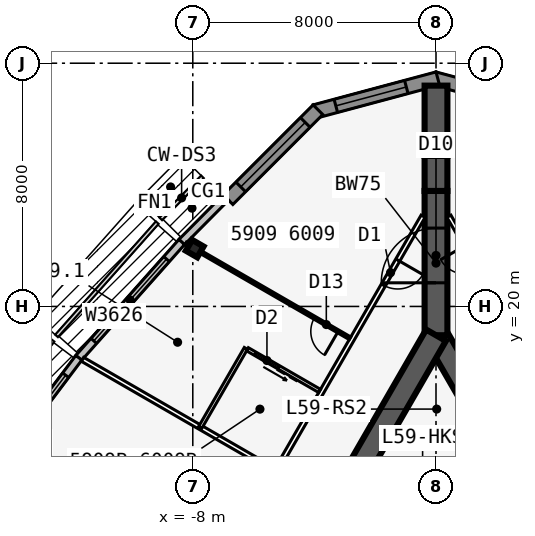
"""IFC4 building model, lengths in metres.
Left out: names, types, materials, properties, quantities, classifications, styles, units other than length and angle.
Written with IfcOpenShell. Run it as: python <this file> out.ifc"""

import sys

from ifc_helpers import new_model, si_unit, direction, frame, frame_2d, origin, origin_2d, place, context, subcontext, project, spatial, polyline, rectangle, i_section, outline, extrude, element, fill, save


model = new_model("IFC4")
c1 = context("Model", 3, precision=1e-05, world=origin(), true_north=direction((0.0, 1.0)))
c2 = subcontext(c1, "Body", "Model", "MODEL_VIEW")
j1 = project(units=[si_unit("LENGTHUNIT", "METRE"), si_unit("PLANEANGLEUNIT", "RADIAN")], contexts=[c1])
p1 = place(None, origin())
s1 = spatial("IfcSite", under=j1, at=p1, CompositionType="ELEMENT")
p2 = place(p1, origin())
s2 = spatial("IfcBuilding", under=s1, at=p2, CompositionType="ELEMENT")
p3 = place(p2, frame((0.0, 0.0, 222.5)))
s3 = spatial("IfcBuildingStorey", under=s2, at=p3, CompositionType="ELEMENT", Elevation=222.5)
p4 = place(p3, frame((16.5, -9.526, 0.0), z_axis=(0.0, 0.0, 1.0), x_axis=(-0.499999749417, 0.866025548458, 0.0)))
e1 = element("IfcWall", 1, at=p4, inside=s3, PredefinedType="SHEAR", context=c2, shape_type="SweptSolid", body=[
    extrude(rectangle(XDim=33.0, YDim=0.75, at=frame_2d((16.5, 0.0))), origin(), (0.0, 0.0, 1.0), 3.6),
])
p5 = place(p4, frame((14.15, 0.0, 0.0)))
e2 = element("IfcOpeningElement", 2, at=p5, cuts=e1, PredefinedType="OPENING", context=c2, shape_type="SweptSolid", body=[
    extrude(rectangle(XDim=1.8, YDim=2.13, at=frame_2d((0.9, 1.065))), frame((0.0, 0.385, 0.0), z_axis=(0.0, -1.0, 0.0), x_axis=(1.0, 0.0, 0.0)), (0.0, 0.0, 1.0), 0.77),
])
p6 = place(p4, frame((12.6, 0.0, 0.0)))
e3 = element("IfcOpeningElement", 3, at=p6, cuts=e1, PredefinedType="OPENING", context=c2, shape_type="SweptSolid", body=[
    extrude(rectangle(XDim=1.0, YDim=2.13, at=frame_2d((0.5, 1.065))), frame((0.0, 0.385, 0.0), z_axis=(0.0, -1.0, 0.0), x_axis=(1.0, 0.0, 0.0)), (0.0, 0.0, 1.0), 0.77),
])
p7 = place(p3, frame((0.0, 19.052, 0.0), z_axis=(0.0, 0.0, 1.0), x_axis=(-0.499999749417, -0.866025548458, 0.0)))
e4 = element("IfcWall", 4, at=p7, inside=s3, PredefinedType="SHEAR", context=c2, shape_type="SweptSolid", body=[
    extrude(rectangle(XDim=33.0, YDim=0.75, at=frame_2d((16.5, 0.0))), origin(), (0.0, 0.0, 1.0), 3.6),
])
p8 = place(p7, frame((14.15, 0.0, 0.0)))
e5 = element("IfcOpeningElement", 5, at=p8, cuts=e4, PredefinedType="OPENING", context=c2, shape_type="SweptSolid", body=[
    extrude(rectangle(XDim=1.8, YDim=2.13, at=frame_2d((0.9, 1.065))), frame((0.0, 0.385, 0.0), z_axis=(0.0, -1.0, 0.0), x_axis=(1.0, 0.0, 0.0)), (0.0, 0.0, 1.0), 0.77),
])
p9 = place(p7, frame((12.6, 0.0, 0.0)))
e6 = element("IfcOpeningElement", 6, at=p9, cuts=e4, PredefinedType="OPENING", context=c2, shape_type="SweptSolid", body=[
    extrude(rectangle(XDim=1.0, YDim=2.13, at=frame_2d((0.5, 1.065))), frame((0.0, 0.385, 0.0), z_axis=(0.0, -1.0, 0.0), x_axis=(1.0, 0.0, 0.0)), (0.0, 0.0, 1.0), 0.77),
])
p10 = place(p3, frame((0.0, 19.052, 0.0), z_axis=(0.0, 0.0, 1.0), x_axis=(0.0, 1.0, 0.0)))
e7 = element("IfcWall", 7, at=p10, inside=s3, PredefinedType="SHEAR", context=c2, shape_type="SweptSolid", body=[
    extrude(rectangle(XDim=4.746, YDim=0.75, at=frame_2d((2.373, 0.0))), origin(), (0.0, 0.0, 1.0), 3.6),
])
p11 = place(p10, frame((1.725, 0.0, 0.0)))
e8 = element("IfcOpeningElement", 8, at=p11, cuts=e7, PredefinedType="OPENING", context=c2, shape_type="SweptSolid", body=[
    extrude(rectangle(XDim=1.8, YDim=2.13, at=frame_2d((0.9, 1.065))), frame((0.0, 0.385, 0.0), z_axis=(0.0, -1.0, 0.0), x_axis=(1.0, 0.0, 0.0)), (0.0, 0.0, 1.0), 0.77),
])
p12 = place(p3, frame((0.0, 23.799, 0.0), z_axis=(0.0, 0.0, 1.0), x_axis=(0.0, 1.0, 0.0)))
e9 = element("IfcWall", 9, at=p12, inside=s3, PredefinedType="SHEAR", context=c2, shape_type="SweptSolid", body=[
    extrude(rectangle(XDim=1.155, YDim=0.75, at=frame_2d((0.577, 0.0))), origin(), (0.0, 0.0, 1.0), 3.6),
])
p13 = place(p3, frame((0.0, 24.953, 0.0), z_axis=(0.0, 0.0, 1.0), x_axis=(0.0, 1.0, 0.0)))
e10 = element("IfcWall", 10, at=p13, inside=s3, PredefinedType="SHEAR", context=c2, shape_type="SweptSolid", body=[
    extrude(rectangle(XDim=2.309, YDim=0.75, at=frame_2d((1.155, 0.0))), origin(), (0.0, 0.0, 1.0), 3.6),
])
p14 = place(p3, frame((-7.937, 21.903, 0.0), z_axis=(0.0, 0.0, 1.0), x_axis=(-0.5, -0.866025403784, 0.0)))
e11 = element("IfcColumn", 11, at=p14, inside=s3, PredefinedType="COLUMN", context=c2, shape_type="SweptSolid", body=[
    extrude(i_section(OverallWidth=0.411, OverallDepth=0.434, WebThickness=0.036, FlangeThickness=0.057, at=origin_2d()), origin(), (0.0, 0.0, 1.0), 3.6),
])
p15 = place(p3, frame((3.983, 26.413, 0.0), z_axis=(0.0, 0.0, 1.0), x_axis=(-0.965920442324, 0.258839137498, 0.0)))
e12 = element("IfcWall", 12, at=p15, inside=s3, PredefinedType="SOLIDWALL", context=c2, shape_type="SweptSolid", body=[
    extrude(outline(polyline([(4.184, 0.225), (4.124, 0.225), (3.706, 0.113), (3.676, 0.225), (0.0, 0.225), (0.0, -0.225), (4.184, -0.225), (4.184, 0.225)])), origin(), (0.0, 0.0, 1.0), 3.435),
])
p16 = place(p15, frame((0.713, 0.0, 0.45)))
e13 = element("IfcOpeningElement", 13, at=p16, cuts=e12, PredefinedType="OPENING", context=c2, shape_type="SweptSolid", body=[
    extrude(rectangle(XDim=2.4, YDim=2.6, at=frame_2d((1.2, 1.3))), frame((0.0, 0.235, 0.0), z_axis=(0.0, -1.0, 0.0), x_axis=(1.0, 0.0, 0.0)), (0.0, 0.0, 1.0), 0.47),
])
p17 = place(p3, frame((0.058, 27.496, 0.0), z_axis=(0.0, 0.0, 1.0), x_axis=(-0.965920442324, -0.258839137498, 0.0)))
e14 = element("IfcWall", 14, at=p17, inside=s3, PredefinedType="SOLIDWALL", context=c2, shape_type="SweptSolid", body=[
    extrude(outline(polyline([(4.184, 0.225), (0.509, 0.225), (0.479, 0.113), (0.06, 0.225), (0.0, 0.225), (0.0, -0.225), (4.184, -0.225), (4.184, 0.225)])), origin(), (0.0, 0.0, 1.0), 3.435),
])
p18 = place(p17, frame((1.071, 0.0, 0.45)))
e15 = element("IfcOpeningElement", 15, at=p18, cuts=e14, PredefinedType="OPENING", context=c2, shape_type="SweptSolid", body=[
    extrude(rectangle(XDim=2.4, YDim=2.6, at=frame_2d((1.2, 1.3))), frame((0.0, 0.235, 0.0), z_axis=(0.0, -1.0, 0.0), x_axis=(1.0, 0.0, 0.0)), (0.0, 0.0, 1.0), 0.47),
])
p19 = place(p3, frame((-3.882, 26.471, 0.0), z_axis=(0.0, 0.0, 1.0), x_axis=(-0.707106781187, -0.707106781187, 0.0)))
e16 = element("IfcWall", 16, at=p19, inside=s3, PredefinedType="SOLIDWALL", context=c2, shape_type="SweptSolid", body=[
    extrude(rectangle(XDim=4.184, YDim=0.45, at=frame_2d((2.092, 0.0))), origin(), (0.0, 0.0, 1.0), 3.435),
])
p20 = place(p19, frame((0.592, 0.0, 0.45)))
e17 = element("IfcOpeningElement", 17, at=p20, cuts=e16, PredefinedType="OPENING", context=c2, shape_type="SweptSolid", body=[
    extrude(rectangle(XDim=3.0, YDim=2.6, at=frame_2d((1.5, 1.3))), frame((0.0, 0.235, 0.0), z_axis=(0.0, -1.0, 0.0), x_axis=(1.0, 0.0, 0.0)), (0.0, 0.0, 1.0), 0.47),
])
p21 = place(p3, frame((-6.911, 23.583, 0.0), z_axis=(0.0, 0.0, 1.0), x_axis=(-0.704149946111, -0.710051303352, 0.0)))
e18 = element("IfcWall", 18, at=p21, inside=s3, PredefinedType="STANDARD", context=c2, shape_type="SweptSolid", body=[
    extrude(rectangle(XDim=2.069, YDim=0.25, at=frame_2d((1.034, 0.0))), origin(), (0.0, 0.0, 1.0), 3.435),
])
p22 = place(p3, frame((-8.363, 22.12, 0.0), z_axis=(0.0, 0.0, 1.0), x_axis=(-0.664348996191, -0.747422511876, 0.0)))
e19 = element("IfcWall", 19, at=p22, inside=s3, PredefinedType="STANDARD", context=c2, shape_type="SweptSolid", body=[
    extrude(rectangle(XDim=5.105, YDim=0.25, at=frame_2d((2.552, 0.0))), origin(), (0.0, 0.0, 1.0), 3.435),
])
p23 = place(p22, frame((0.752, 0.0, 0.45)))
e20 = element("IfcOpeningElement", 20, at=p23, cuts=e19, PredefinedType="OPENING", context=c2, shape_type="SweptSolid", body=[
    extrude(rectangle(XDim=3.6, YDim=2.6, at=frame_2d((1.8, 1.3))), frame((0.0, 0.135, 0.0), z_axis=(0.0, -1.0, 0.0), x_axis=(1.0, 0.0, 0.0)), (0.0, 0.0, 1.0), 0.27),
])
p24 = place(p3, frame((-11.748, 18.312, 0.0), z_axis=(0.0, 0.0, 1.0), x_axis=(-0.602408653511, -0.798187831388, 0.0)))
e21 = element("IfcWall", 21, at=p24, inside=s3, PredefinedType="STANDARD", context=c2, shape_type="SweptSolid", body=[
    extrude(rectangle(XDim=5.038, YDim=0.25, at=frame_2d((2.519, 0.0))), origin(), (0.0, 0.0, 1.0), 3.435),
])
p25 = place(p24, frame((0.719, 0.0, 0.45)))
e22 = element("IfcOpeningElement", 22, at=p25, cuts=e21, PredefinedType="OPENING", context=c2, shape_type="SweptSolid", body=[
    extrude(rectangle(XDim=3.6, YDim=2.6, at=frame_2d((1.8, 1.3))), frame((0.0, 0.135, 0.0), z_axis=(0.0, -1.0, 0.0), x_axis=(1.0, 0.0, 0.0)), (0.0, 0.0, 1.0), 0.27),
])
p26 = place(p3, frame((20.102, -11.115, 0.0), z_axis=(0.0, 0.0, 1.0), x_axis=(-0.500000265775, 0.866025250339, 0.0)))
e23 = element("IfcWall", 23, at=p26, inside=s3, PredefinedType="PARTITIONING", context=c2, shape_type="SweptSolid", body=[
    extrude(rectangle(XDim=39.354, YDim=0.15, at=frame_2d((19.677, 0.0))), origin(), (0.0, 0.0, 1.0), 3.435),
])
p27 = place(p26, frame((1.102, 0.0, 0.0)))
e24 = element("IfcOpeningElement", 24, at=p27, cuts=e23, PredefinedType="OPENING", context=c2, shape_type="SweptSolid", body=[
    extrude(rectangle(XDim=0.95, YDim=2.13, at=frame_2d((0.475, 1.065))), frame((0.0, 0.085, 0.0), z_axis=(0.0, -1.0, 0.0), x_axis=(1.0, 0.0, 0.0)), (0.0, 0.0, 1.0), 0.17),
])
p28 = place(p26, frame((11.702, 0.0, 0.0)))
e25 = element("IfcOpeningElement", 25, at=p28, cuts=e23, PredefinedType="OPENING", context=c2, shape_type="SweptSolid", body=[
    extrude(rectangle(XDim=0.95, YDim=2.13, at=frame_2d((0.475, 1.065))), frame((0.0, 0.085, 0.0), z_axis=(0.0, -1.0, 0.0), x_axis=(1.0, 0.0, 0.0)), (0.0, 0.0, 1.0), 0.17),
])
p29 = place(p26, frame((26.702, 0.0, 0.0)))
e26 = element("IfcOpeningElement", 26, at=p29, cuts=e23, PredefinedType="OPENING", context=c2, shape_type="SweptSolid", body=[
    extrude(rectangle(XDim=0.95, YDim=2.13, at=frame_2d((0.475, 1.065))), frame((0.0, 0.085, 0.0), z_axis=(0.0, -1.0, 0.0), x_axis=(1.0, 0.0, 0.0)), (0.0, 0.0, 1.0), 0.17),
])
p30 = place(p26, frame((37.302, 0.0, 0.0)))
e27 = element("IfcOpeningElement", 27, at=p30, cuts=e23, PredefinedType="OPENING", context=c2, shape_type="SweptSolid", body=[
    extrude(rectangle(XDim=0.95, YDim=2.13, at=frame_2d((0.475, 1.065))), frame((0.0, 0.085, 0.0), z_axis=(0.0, -1.0, 0.0), x_axis=(1.0, 0.0, 0.0)), (0.0, 0.0, 1.0), 0.17),
])
p31 = place(p3, frame((-0.425, 22.966, 0.0), z_axis=(0.0, 0.0, 1.0), x_axis=(-0.500000265775, -0.866025250339, 0.0)))
e28 = element("IfcWall", 28, at=p31, inside=s3, PredefinedType="PARTITIONING", context=c2, shape_type="SweptSolid", body=[
    extrude(rectangle(XDim=39.354, YDim=0.15, at=frame_2d((19.677, 0.0))), origin(), (0.0, 0.0, 1.0), 3.435),
])
p32 = place(p31, frame((1.665, 0.0, 0.0)))
e29 = element("IfcOpeningElement", 29, at=p32, cuts=e28, PredefinedType="OPENING", context=c2, shape_type="SweptSolid", body=[
    extrude(rectangle(XDim=0.95, YDim=2.13, at=frame_2d((0.475, 1.065))), frame((0.0, 0.085, 0.0), z_axis=(0.0, -1.0, 0.0), x_axis=(1.0, 0.0, 0.0)), (0.0, 0.0, 1.0), 0.17),
])
p33 = place(p31, frame((11.702, 0.0, 0.0)))
e30 = element("IfcOpeningElement", 30, at=p33, cuts=e28, PredefinedType="OPENING", context=c2, shape_type="SweptSolid", body=[
    extrude(rectangle(XDim=0.95, YDim=2.13, at=frame_2d((0.475, 1.065))), frame((0.0, 0.085, 0.0), z_axis=(0.0, -1.0, 0.0), x_axis=(1.0, 0.0, 0.0)), (0.0, 0.0, 1.0), 0.17),
])
p34 = place(p31, frame((21.702, 0.0, 0.0)))
e31 = element("IfcOpeningElement", 31, at=p34, cuts=e28, PredefinedType="OPENING", context=c2, shape_type="SweptSolid", body=[
    extrude(rectangle(XDim=0.95, YDim=2.13, at=frame_2d((0.475, 1.065))), frame((0.0, 0.085, 0.0), z_axis=(0.0, -1.0, 0.0), x_axis=(1.0, 0.0, 0.0)), (0.0, 0.0, 1.0), 0.17),
])
p35 = place(p31, frame((36.739, 0.0, 0.0)))
e32 = element("IfcOpeningElement", 32, at=p35, cuts=e28, PredefinedType="OPENING", context=c2, shape_type="SweptSolid", body=[
    extrude(rectangle(XDim=0.95, YDim=2.13, at=frame_2d((0.475, 1.065))), frame((0.0, 0.085, 0.0), z_axis=(0.0, -1.0, 0.0), x_axis=(1.0, 0.0, 0.0)), (0.0, 0.0, 1.0), 0.17),
])
p36 = place(p3, frame((-2.829, 18.954, 0.0), z_axis=(0.0, 0.0, 1.0), x_axis=(-0.866026604282, 0.499997920671, 0.0)))
e33 = element("IfcWall", 33, at=p36, inside=s3, PredefinedType="PARTITIONING", context=c2, shape_type="SweptSolid", body=[
    extrude(rectangle(XDim=6.24, YDim=0.1, at=frame_2d((3.12, 0.0))), origin(), (0.0, 0.0, 1.0), 2.589),
])
p37 = place(p36, frame((0.45, 0.0, 0.0)))
e34 = element("IfcOpeningElement", 34, at=p37, cuts=e33, PredefinedType="OPENING", context=c2, shape_type="SweptSolid", body=[
    extrude(rectangle(XDim=0.9, YDim=2.13, at=frame_2d((0.45, 1.065))), frame((0.0, 0.06, 0.0), z_axis=(0.0, -1.0, 0.0), x_axis=(1.0, 0.0, 0.0)), (0.0, 0.0, 1.0), 0.12),
])
p38 = place(p3, frame((-5.329, 14.623, 0.0), z_axis=(0.0, 0.0, 1.0), x_axis=(-0.866017877653, 0.500013035415, 0.0)))
e35 = element("IfcWall", 35, at=p38, inside=s3, PredefinedType="PARTITIONING", context=c2, shape_type="SweptSolid", body=[
    extrude(rectangle(XDim=7.273, YDim=0.15, at=frame_2d((3.636, 0.0))), origin(), (0.0, 0.0, 1.0), 2.589),
])
p39 = place(p3, frame((-6.253, 18.622, 0.0), z_axis=(0.0, 0.0, 1.0), x_axis=(-0.499990139034, -0.866031096941, 0.0)))
e36 = element("IfcWall", 36, at=p39, inside=s3, PredefinedType="PLUMBINGWALL", context=c2, shape_type="SweptSolid", body=[
    extrude(rectangle(XDim=3.0, YDim=0.12, at=frame_2d((1.5, 0.0))), origin(), (0.0, 0.0, 1.0), 3.435),
])
p40 = place(p3, frame((-3.829, 17.221, 0.0), z_axis=(0.0, 0.0, 1.0), x_axis=(-0.865997131366, 0.500048966069, 0.0)))
e37 = element("IfcWall", 37, at=p40, inside=s3, PredefinedType="PLUMBINGWALL", context=c2, shape_type="SweptSolid", body=[
    extrude(rectangle(XDim=2.74, YDim=0.12, at=frame_2d((1.37, 0.0))), origin(), (0.0, 0.0, 1.0), 3.435),
])
p41 = place(p40, frame((1.55, 0.0, 0.0)))
e38 = element("IfcOpeningElement", 38, at=p41, cuts=e37, PredefinedType="OPENING", context=c2, shape_type="SweptSolid", body=[
    extrude(rectangle(XDim=0.9, YDim=2.13, at=frame_2d((0.45, 1.065))), frame((0.0, 0.07, 0.0), z_axis=(0.0, -1.0, 0.0), x_axis=(1.0, 0.0, 0.0)), (0.0, 0.0, 1.0), 0.14),
])
p42 = place(p3, frame((-1.501, 15.703, 0.0), z_axis=(0.0, 0.0, 1.0), x_axis=(1.0, 0.0, 0.0)))
e39 = element("IfcWall", 39, at=p42, inside=s3, PredefinedType="SOLIDWALL", context=c2, shape_type="SweptSolid", body=[
    extrude(rectangle(XDim=3.002, YDim=0.2, at=frame_2d((1.501, 0.0))), origin(), (0.0, 0.0, 1.0), 3.435),
])
p43 = place(p18, origin())
e40 = element("IfcWindow", 40, at=p43, inside=s3, PartitioningType="SINGLE_PANEL", PredefinedType="WINDOW", context=c2, shape_type="SweptSolid", body=[
    extrude(rectangle(XDim=2.4, YDim=2.6, at=frame_2d((1.2, 1.3))), frame((0.0, 0.03, 0.0), z_axis=(0.0, -1.0, 0.0), x_axis=(1.0, 0.0, 0.0)), (0.0, 0.0, 1.0), 0.06),
])
fill(e15, e40)
p44 = place(p20, origin())
e41 = element("IfcWindow", 41, at=p44, inside=s3, PartitioningType="SINGLE_PANEL", PredefinedType="WINDOW", context=c2, shape_type="SweptSolid", body=[
    extrude(rectangle(XDim=3.0, YDim=2.6, at=frame_2d((1.5, 1.3))), frame((0.0, 0.03, 0.0), z_axis=(0.0, -1.0, 0.0), x_axis=(1.0, 0.0, 0.0)), (0.0, 0.0, 1.0), 0.06),
])
fill(e17, e41)
p45 = place(p23, origin())
e42 = element("IfcWindow", 42, at=p45, inside=s3, PartitioningType="SINGLE_PANEL", PredefinedType="WINDOW", context=c2, shape_type="SweptSolid", body=[
    extrude(rectangle(XDim=3.6, YDim=2.6, at=frame_2d((1.8, 1.3))), frame((0.0, 0.03, 0.0), z_axis=(0.0, -1.0, 0.0), x_axis=(1.0, 0.0, 0.0)), (0.0, 0.0, 1.0), 0.06),
])
fill(e20, e42)
p46 = place(p25, origin())
e43 = element("IfcWindow", 43, at=p46, inside=s3, PartitioningType="SINGLE_PANEL", PredefinedType="WINDOW", context=c2, shape_type="SweptSolid", body=[
    extrude(rectangle(XDim=3.6, YDim=2.6, at=frame_2d((1.8, 1.3))), frame((0.0, 0.03, 0.0), z_axis=(0.0, -1.0, 0.0), x_axis=(1.0, 0.0, 0.0)), (0.0, 0.0, 1.0), 0.06),
])
fill(e22, e43)
p47 = place(p37, origin())
e44 = element("IfcDoor", 44, at=p47, inside=s3, OperationType="SINGLE_SWING_LEFT", PredefinedType="DOOR", context=c2, shape_type="SweptSolid", body=[
    extrude(rectangle(XDim=0.9, YDim=2.13, at=frame_2d((0.45, 1.065))), frame((0.0, 0.025, 0.0), z_axis=(0.0, -1.0, 0.0), x_axis=(1.0, 0.0, 0.0)), (0.0, 0.0, 1.0), 0.05),
])
fill(e34, e44)
p48 = place(p32, origin())
e45 = element("IfcDoor", 45, at=p48, inside=s3, OperationType="SINGLE_SWING_LEFT", PredefinedType="DOOR", context=c2, shape_type="SweptSolid", body=[
    extrude(rectangle(XDim=0.95, YDim=2.13, at=frame_2d((0.475, 1.065))), frame((0.0, 0.025, 0.0), z_axis=(0.0, -1.0, 0.0), x_axis=(1.0, 0.0, 0.0)), (0.0, 0.0, 1.0), 0.05),
])
fill(e29, e45)
p49 = place(p41, origin())
e46 = element("IfcDoor", 46, at=p49, inside=s3, OperationType="SLIDING_TO_LEFT", PredefinedType="DOOR", context=c2, shape_type="SweptSolid", body=[
    extrude(rectangle(XDim=0.9, YDim=2.13, at=frame_2d((0.45, 1.065))), frame((0.0, 0.025, 0.0), z_axis=(0.0, -1.0, 0.0), x_axis=(1.0, 0.0, 0.0)), (0.0, 0.0, 1.0), 0.05),
])
fill(e38, e46)
p50 = place(p11, origin())
e47 = element("IfcDoor", 47, at=p50, inside=s3, OperationType="DOUBLE_DOOR_DOUBLE_SWING", PredefinedType="DOOR", context=c2, shape_type="SweptSolid", body=[
    extrude(rectangle(XDim=1.8, YDim=2.13, at=frame_2d((0.9, 1.065))), frame((0.0, 0.025, 0.0), z_axis=(0.0, -1.0, 0.0), x_axis=(1.0, 0.0, 0.0)), (0.0, 0.0, 1.0), 0.05),
])
fill(e8, e47)
save(model, sys.argv[1])
